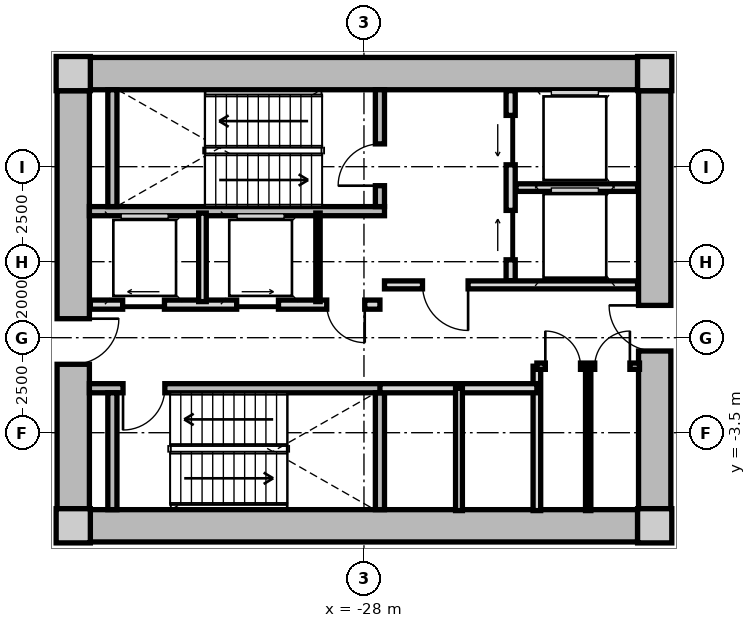
"""IFC4 building model, lengths in metres.
Left out: names, types, materials, properties, quantities, classifications, styles, units other than length and angle.
Written with IfcOpenShell. Run it as: python <this file> out.ifc"""

import sys

from ifc_helpers import new_model, si_unit, direction, frame, frame_2d, origin, origin_2d, place, context, subcontext, project, spatial, rectangle, extrude, source, transform, mapped, element, fill, save


model = new_model("IFC4")
c1 = context("Model", 3, precision=1e-05, world=origin(), true_north=direction((0.0, 1.0)))
c2 = subcontext(c1, "Body", "Model", "MODEL_VIEW")
j1 = project(units=[si_unit("LENGTHUNIT", "METRE"), si_unit("PLANEANGLEUNIT", "RADIAN")], contexts=[c1])
p1 = place(None, origin())
s1 = spatial("IfcSite", under=j1, at=p1, CompositionType="ELEMENT")
p2 = place(p1, origin())
s2 = spatial("IfcBuilding", under=s1, at=p2, CompositionType="ELEMENT")
p3 = place(p2, frame((0.0, 0.0, 12.6)))
s3 = spatial("IfcBuildingStorey", under=s2, at=p3, CompositionType="ELEMENT", Elevation=12.6)
m1 = source(origin(), c2, "Body", "SweptSolid", [
    extrude(rectangle(XDim=0.9, YDim=0.9, at=origin_2d()), origin(), (0.0, 0.0, 1.0), 4.2),
])
for number, where, z_axis, x_axis in (
    (1, (-35.65, -5.95, 0.0), (0.0, 0.0, 1.0), (1.0, 0.0, 0.0)),
    (2, (-20.35, -5.95, 0.0), (0.0, 0.0, 1.0), (1.0, 0.0, 0.0)),
    (3, (-20.35, 5.95, 0.0), (0.0, 0.0, 1.0), (1.0, 0.0, 0.0)),
    (4, (-35.65, 5.95, 0.0), (0.0, 0.0, 1.0), (1.0, 0.0, 0.0)),
):
    element("IfcColumn", number, at=place(p3, frame(where, z_axis=z_axis, x_axis=x_axis)), inside=s3, PredefinedType="COLUMN", context=c2, shape_type="MappedRepresentation", body=[
        mapped(m1, transform((0.0, 0.0, 0.0), x_axis=(1.0, 0.0, 0.0), y_axis=(0.0, 1.0, 0.0), z_axis=(0.0, 0.0, 1.0), scale=1.0)),
    ])
m2 = source(origin(), c2, "Body", "SweptSolid", [
    extrude(rectangle(XDim=14.4, YDim=0.85, at=frame_2d((7.2, 0.0))), origin(), (0.0, 0.0, 1.0), 3.88),
])
for number, where, z_axis, x_axis in (
    (5, (-35.2, 5.95, 0.0), (0.0, 0.0, 1.0), (1.0, 0.0, 0.0)),
    (6, (-20.8, -5.95, 0.0), (0.0, 0.0, 1.0), (-1.0, 0.0, 0.0)),
):
    element("IfcWall", number, at=place(p3, frame(where, z_axis=z_axis, x_axis=x_axis)), inside=s3, PredefinedType="SHEAR", context=c2, shape_type="MappedRepresentation", body=[
        mapped(m2, transform((0.0, 0.0, 0.0), x_axis=(1.0, 0.0, 0.0), y_axis=(0.0, 1.0, 0.0), z_axis=(0.0, 0.0, 1.0), scale=1.0)),
    ])
m3 = source(origin(), c2, "Body", "SweptSolid", [
    extrude(rectangle(XDim=11.0, YDim=0.85, at=frame_2d((5.5, 0.0))), origin(), (0.0, 0.0, 1.0), 3.88),
])
p4 = place(p3, frame((-35.65, -5.5, 0.0), z_axis=(0.0, 0.0, 1.0), x_axis=(0.0, 1.0, 0.0)))
e7 = element("IfcWall", 7, at=p4, inside=s3, PredefinedType="SHEAR", context=c2, shape_type="MappedRepresentation", body=[
    mapped(m3, transform((0.0, 0.0, 0.0), x_axis=(1.0, 0.0, 0.0), y_axis=(0.0, 1.0, 0.0), z_axis=(0.0, 0.0, 1.0), scale=1.0)),
])
p5 = place(p4, frame((3.8, 0.0, 0.0)))
e8 = element("IfcOpeningElement", 8, at=p5, cuts=e7, PredefinedType="OPENING", context=c2, shape_type="SweptSolid", body=[
    extrude(rectangle(XDim=1.2, YDim=2.15, at=frame_2d((0.6, 1.075))), frame((0.0, 0.435, 0.0), z_axis=(0.0, -1.0, 0.0), x_axis=(1.0, 0.0, 0.0)), (0.0, 0.0, 1.0), 0.87),
])
p6 = place(p3, frame((-20.35, 5.5, 0.0), z_axis=(0.0, 0.0, 1.0), x_axis=(0.0, -1.0, 0.0)))
e9 = element("IfcWall", 9, at=p6, inside=s3, PredefinedType="SHEAR", context=c2, shape_type="MappedRepresentation", body=[
    mapped(m3, transform((0.0, 0.0, 0.0), x_axis=(1.0, 0.0, 0.0), y_axis=(0.0, 1.0, 0.0), z_axis=(0.0, 0.0, 1.0), scale=1.0)),
])
p7 = place(p6, frame((5.65, 0.0, 0.0)))
e10 = element("IfcOpeningElement", 10, at=p7, cuts=e9, PredefinedType="OPENING", context=c2, shape_type="SweptSolid", body=[
    extrude(rectangle(XDim=1.2, YDim=2.15, at=frame_2d((0.6, 1.075))), frame((0.0, 0.435, 0.0), z_axis=(0.0, -1.0, 0.0), x_axis=(1.0, 0.0, 0.0)), (0.0, 0.0, 1.0), 0.87),
])
m4 = source(origin(), c2, "Body", "SweptSolid", [
    extrude(rectangle(XDim=7.765, YDim=0.24, at=frame_2d((3.883, 0.0))), origin(), (0.0, 0.0, 1.0), 3.88),
])
p8 = place(p3, frame((-35.225, 2.33, 0.0), z_axis=(0.0, 0.0, 1.0), x_axis=(1.0, 0.0, 0.0)))
e11 = element("IfcWall", 11, at=p8, inside=s3, PredefinedType="PARTITIONING", context=c2, shape_type="MappedRepresentation", body=[
    mapped(m4, transform((0.0, 0.0, 0.0), x_axis=(1.0, 0.0, 0.0), y_axis=(0.0, 1.0, 0.0), z_axis=(0.0, 0.0, 1.0), scale=1.0)),
])
m5 = source(origin(), c2, "Body", "SweptSolid", [
    extrude(rectangle(XDim=3.075, YDim=0.24, at=frame_2d((1.538, 0.0))), origin(), (0.0, 0.0, 1.0), 3.88),
])
p9 = place(p3, frame((-34.62, 2.45, 0.0), z_axis=(0.0, 0.0, 1.0), x_axis=(0.0, 1.0, 0.0)))
e12 = element("IfcWall", 12, at=p9, inside=s3, PredefinedType="PARTITIONING", context=c2, shape_type="MappedRepresentation", body=[
    mapped(m5, transform((0.0, 0.0, 0.0), x_axis=(1.0, 0.0, 0.0), y_axis=(0.0, 1.0, 0.0), z_axis=(0.0, 0.0, 1.0), scale=1.0)),
])
p10 = place(p3, frame((-27.58, 2.45, 0.0), z_axis=(0.0, 0.0, 1.0), x_axis=(0.0, 1.0, 0.0)))
e13 = element("IfcWall", 13, at=p10, inside=s3, PredefinedType="PARTITIONING", context=c2, shape_type="MappedRepresentation", body=[
    mapped(m5, transform((0.0, 0.0, 0.0), x_axis=(1.0, 0.0, 0.0), y_axis=(0.0, 1.0, 0.0), z_axis=(0.0, 0.0, 1.0), scale=1.0)),
])
p11 = place(p10, frame((0.55, 0.0, 0.0)))
e14 = element("IfcOpeningElement", 14, at=p11, cuts=e13, PredefinedType="OPENING", context=c2, shape_type="SweptSolid", body=[
    extrude(rectangle(XDim=1.1, YDim=2.15, at=frame_2d((0.55, 1.075))), frame((0.0, 0.13, 0.0), z_axis=(0.0, -1.0, 0.0), x_axis=(1.0, 0.0, 0.0)), (0.0, 0.0, 1.0), 0.26),
])
p12 = place(p3, frame((-35.225, -2.33, 0.0), z_axis=(0.0, 0.0, 1.0), x_axis=(1.0, 0.0, 0.0)))
e15 = element("IfcWall", 15, at=p12, inside=s3, PredefinedType="PARTITIONING", context=c2, shape_type="MappedRepresentation", body=[
    mapped(m4, transform((0.0, 0.0, 0.0), x_axis=(1.0, 0.0, 0.0), y_axis=(0.0, 1.0, 0.0), z_axis=(0.0, 0.0, 1.0), scale=1.0)),
])
p13 = place(p12, frame((0.885, 0.0, 0.0)))
e16 = element("IfcOpeningElement", 16, at=p13, cuts=e15, PredefinedType="OPENING", context=c2, shape_type="SweptSolid", body=[
    extrude(rectangle(XDim=1.1, YDim=2.15, at=frame_2d((0.55, 1.075))), frame((0.0, 0.13, 0.0), z_axis=(0.0, -1.0, 0.0), x_axis=(1.0, 0.0, 0.0)), (0.0, 0.0, 1.0), 0.26),
])
for number, where, z_axis, x_axis in (
    (17, (-34.62, -5.525, 0.0), (0.0, 0.0, 1.0), (0.0, 1.0, 0.0)),
    (18, (-27.58, -5.525, 0.0), (0.0, 0.0, 1.0), (0.0, 1.0, 0.0)),
):
    element("IfcWall", number, at=place(p3, frame(where, z_axis=z_axis, x_axis=x_axis)), inside=s3, PredefinedType="PARTITIONING", context=c2, shape_type="MappedRepresentation", body=[
        mapped(m5, transform((0.0, 0.0, 0.0), x_axis=(1.0, 0.0, 0.0), y_axis=(0.0, 1.0, 0.0), z_axis=(0.0, 0.0, 1.0), scale=1.0)),
    ])
m6 = source(origin(), c2, "Body", "SweptSolid", [
    extrude(rectangle(XDim=5.0, YDim=0.24, at=frame_2d((2.5, 0.0))), origin(), (0.0, 0.0, 1.0), 3.865),
])
p14 = place(p3, frame((-24.14, 0.5, 0.0), z_axis=(0.0, 0.0, 1.0), x_axis=(0.0, 1.0, 0.0)))
e19 = element("IfcWall", 19, at=p14, inside=s3, PredefinedType="PARTITIONING", context=c2, shape_type="MappedRepresentation", body=[
    mapped(m6, transform((0.0, 0.0, 0.0), x_axis=(1.0, 0.0, 0.0), y_axis=(0.0, 1.0, 0.0), z_axis=(0.0, 0.0, 1.0), scale=1.0)),
])
p15 = place(p14, frame((3.05, 0.0, 0.0)))
e20 = element("IfcOpeningElement", 20, at=p15, cuts=e19, PredefinedType="OPENING", context=c2, shape_type="SweptSolid", body=[
    extrude(rectangle(XDim=1.3, YDim=2.2, at=frame_2d((0.65, 1.1))), frame((0.0, 0.13, 0.0), z_axis=(0.0, -1.0, 0.0), x_axis=(1.0, 0.0, 0.0)), (0.0, 0.0, 1.0), 0.26),
])
p16 = place(p14, frame((0.55, 0.0, 0.0)))
e21 = element("IfcOpeningElement", 21, at=p16, cuts=e19, PredefinedType="OPENING", context=c2, shape_type="SweptSolid", body=[
    extrude(rectangle(XDim=1.3, YDim=2.2, at=frame_2d((0.65, 1.1))), frame((0.0, 0.13, 0.0), z_axis=(0.0, -1.0, 0.0), x_axis=(1.0, 0.0, 0.0)), (0.0, 0.0, 1.0), 0.26),
])
m7 = source(origin(), c2, "Body", "SweptSolid", [
    extrude(rectangle(XDim=3.2, YDim=0.2, at=frame_2d((1.6, 0.0))), origin(), (0.0, 0.0, 1.0), 3.865),
])
p17 = place(p3, frame((-24.0, 2.95, 0.0), z_axis=(0.0, 0.0, 1.0), x_axis=(1.0, 0.0, 0.0)))
e22 = element("IfcWall", 22, at=p17, inside=s3, PredefinedType="PARTITIONING", context=c2, shape_type="MappedRepresentation", body=[
    mapped(m7, transform((0.0, 0.0, 0.0), x_axis=(1.0, 0.0, 0.0), y_axis=(0.0, 1.0, 0.0), z_axis=(0.0, 0.0, 1.0), scale=1.0)),
])
m8 = source(origin(), c2, "Body", "SweptSolid", [
    extrude(rectangle(XDim=6.66, YDim=0.21, at=frame_2d((3.33, 0.0))), origin(), (0.0, 0.0, 1.0), 3.865),
])
p18 = place(p3, frame((-27.46, 0.39, 0.0), z_axis=(0.0, 0.0, 1.0), x_axis=(1.0, 0.0, 0.0)))
e23 = element("IfcWall", 23, at=p18, inside=s3, PredefinedType="PARTITIONING", context=c2, shape_type="MappedRepresentation", body=[
    mapped(m8, transform((0.0, 0.0, 0.0), x_axis=(1.0, 0.0, 0.0), y_axis=(0.0, 1.0, 0.0), z_axis=(0.0, 0.0, 1.0), scale=1.0)),
])
p19 = place(p18, frame((1.0, 0.0, 0.0)))
e24 = element("IfcOpeningElement", 24, at=p19, cuts=e23, PredefinedType="OPENING", context=c2, shape_type="SweptSolid", body=[
    extrude(rectangle(XDim=1.2, YDim=2.15, at=frame_2d((0.6, 1.075))), frame((0.0, 0.115, 0.0), z_axis=(0.0, -1.0, 0.0), x_axis=(1.0, 0.0, 0.0)), (0.0, 0.0, 1.0), 0.23),
])
m9 = source(origin(), c2, "Body", "SweptSolid", [
    extrude(rectangle(XDim=7.62, YDim=0.24, at=frame_2d((3.81, 0.0))), origin(), (0.0, 0.0, 1.0), 3.865),
])
p20 = place(p3, frame((-35.2, -0.13, 0.0), z_axis=(0.0, 0.0, 1.0), x_axis=(1.0, 0.0, 0.0)))
e25 = element("IfcWall", 25, at=p20, inside=s3, PredefinedType="PARTITIONING", context=c2, shape_type="MappedRepresentation", body=[
    mapped(m9, transform((0.0, 0.0, 0.0), x_axis=(1.0, 0.0, 0.0), y_axis=(0.0, 1.0, 0.0), z_axis=(0.0, 0.0, 1.0), scale=1.0)),
])
p21 = place(p20, frame((6.22, 0.0, 0.0)))
e26 = element("IfcOpeningElement", 26, at=p21, cuts=e25, PredefinedType="OPENING", context=c2, shape_type="SweptSolid", body=[
    extrude(rectangle(XDim=1.0, YDim=2.1, at=frame_2d((0.5, 1.05))), frame((0.0, 0.13, 0.0), z_axis=(0.0, -1.0, 0.0), x_axis=(1.0, 0.0, 0.0)), (0.0, 0.0, 1.0), 0.26),
])
p22 = place(p20, frame((0.85, 0.0, 0.0)))
e27 = element("IfcOpeningElement", 27, at=p22, cuts=e25, PredefinedType="OPENING", context=c2, shape_type="SweptSolid", body=[
    extrude(rectangle(XDim=1.1, YDim=2.2, at=frame_2d((0.55, 1.1))), frame((0.0, 0.13, 0.0), z_axis=(0.0, -1.0, 0.0), x_axis=(1.0, 0.0, 0.0)), (0.0, 0.0, 1.0), 0.26),
])
p23 = place(p20, frame((3.85, 0.0, 0.0)))
e28 = element("IfcOpeningElement", 28, at=p23, cuts=e25, PredefinedType="OPENING", context=c2, shape_type="SweptSolid", body=[
    extrude(rectangle(XDim=1.1, YDim=2.2, at=frame_2d((0.55, 1.1))), frame((0.0, 0.13, 0.0), z_axis=(0.0, -1.0, 0.0), x_axis=(1.0, 0.0, 0.0)), (0.0, 0.0, 1.0), 0.26),
])
m10 = source(origin(), c2, "Body", "SweptSolid", [
    extrude(rectangle(XDim=2.33, YDim=0.115, at=frame_2d((1.165, 0.0))), origin(), (0.0, 0.0, 1.0), 3.865),
])
p24 = place(p3, frame((-29.21, -0.05, 0.0), z_axis=(0.0, 0.0, 1.0), x_axis=(0.0, 1.0, 0.0)))
e29 = element("IfcWall", 29, at=p24, inside=s3, PredefinedType="PARTITIONING", context=c2, shape_type="MappedRepresentation", body=[
    mapped(m10, transform((0.0, 0.0, 0.0), x_axis=(1.0, 0.0, 0.0), y_axis=(0.0, 1.0, 0.0), z_axis=(0.0, 0.0, 1.0), scale=1.0)),
])
m11 = source(origin(), c2, "Body", "SweptSolid", [
    extrude(rectangle(XDim=2.33, YDim=0.2, at=frame_2d((1.165, 0.0))), origin(), (0.0, 0.0, 1.0), 3.865),
])
p25 = place(p3, frame((-32.25, -0.05, 0.0), z_axis=(0.0, 0.0, 1.0), x_axis=(0.0, 1.0, 0.0)))
e30 = element("IfcWall", 30, at=p25, inside=s3, PredefinedType="PARTITIONING", context=c2, shape_type="MappedRepresentation", body=[
    mapped(m11, transform((0.0, 0.0, 0.0), x_axis=(1.0, 0.0, 0.0), y_axis=(0.0, 1.0, 0.0), z_axis=(0.0, 0.0, 1.0), scale=1.0)),
])
m12 = source(origin(), c2, "Body", "SweptSolid", [
    extrude(rectangle(XDim=3.8, YDim=0.2, at=frame_2d((1.9, 0.0))), origin(), (0.0, 0.0, 1.0), 3.865),
])
p26 = place(p3, frame((-23.45, -5.55, 0.0), z_axis=(0.0, 0.0, 1.0), x_axis=(0.0, 1.0, 0.0)))
e31 = element("IfcWall", 31, at=p26, inside=s3, PredefinedType="PARTITIONING", context=c2, shape_type="MappedRepresentation", body=[
    mapped(m12, transform((0.0, 0.0, 0.0), x_axis=(1.0, 0.0, 0.0), y_axis=(0.0, 1.0, 0.0), z_axis=(0.0, 0.0, 1.0), scale=1.0)),
])
m13 = source(origin(), c2, "Body", "SweptSolid", [
    extrude(rectangle(XDim=4.13, YDim=0.24, at=frame_2d((2.065, 0.0))), origin(), (0.0, 0.0, 1.0), 3.865),
])
p27 = place(p3, frame((-27.58, -2.33, 0.0), z_axis=(0.0, 0.0, 1.0), x_axis=(1.0, 0.0, 0.0)))
e32 = element("IfcWall", 32, at=p27, inside=s3, PredefinedType="PARTITIONING", context=c2, shape_type="MappedRepresentation", body=[
    mapped(m13, transform((0.0, 0.0, 0.0), x_axis=(1.0, 0.0, 0.0), y_axis=(0.0, 1.0, 0.0), z_axis=(0.0, 0.0, 1.0), scale=1.0)),
])
m14 = source(origin(), c2, "Body", "SweptSolid", [
    extrude(rectangle(XDim=3.22, YDim=0.18, at=frame_2d((1.61, 0.0))), origin(), (0.0, 0.0, 1.0), 3.865),
])
p28 = place(p3, frame((-25.5, -5.55, 0.0), z_axis=(0.0, 0.0, 1.0), x_axis=(0.0, 1.0, 0.0)))
e33 = element("IfcWall", 33, at=p28, inside=s3, PredefinedType="PARTITIONING", context=c2, shape_type="MappedRepresentation", body=[
    mapped(m14, transform((0.0, 0.0, 0.0), x_axis=(1.0, 0.0, 0.0), y_axis=(0.0, 1.0, 0.0), z_axis=(0.0, 0.0, 1.0), scale=1.0)),
])
m15 = source(origin(), c2, "Body", "SweptSolid", [
    extrude(rectangle(XDim=2.7, YDim=0.165, at=frame_2d((1.35, 0.0))), origin(), (0.0, 0.0, 1.0), 3.865),
])
p29 = place(p3, frame((-23.45, -1.75, 0.0), z_axis=(0.0, 0.0, 1.0), x_axis=(1.0, 0.0, 0.0)))
e34 = element("IfcWall", 34, at=p29, inside=s3, PredefinedType="PARTITIONING", context=c2, shape_type="MappedRepresentation", body=[
    mapped(m15, transform((0.0, 0.0, 0.0), x_axis=(1.0, 0.0, 0.0), y_axis=(0.0, 1.0, 0.0), z_axis=(0.0, 0.0, 1.0), scale=1.0)),
])
p30 = place(p29, frame((0.222, 0.0, 0.0)))
e35 = element("IfcOpeningElement", 35, at=p30, cuts=e34, PredefinedType="OPENING", context=c2, shape_type="SweptSolid", body=[
    extrude(rectangle(XDim=0.925, YDim=2.1, at=frame_2d((0.462, 1.05))), frame((0.0, 0.093, 0.0), z_axis=(0.0, -1.0, 0.0), x_axis=(1.0, 0.0, 0.0)), (0.0, 0.0, 1.0), 0.185),
])
p31 = place(p29, frame((1.522, 0.0, 0.0)))
e36 = element("IfcOpeningElement", 36, at=p31, cuts=e34, PredefinedType="OPENING", context=c2, shape_type="SweptSolid", body=[
    extrude(rectangle(XDim=0.925, YDim=2.1, at=frame_2d((0.462, 1.05))), frame((0.0, 0.093, 0.0), z_axis=(0.0, -1.0, 0.0), x_axis=(1.0, 0.0, 0.0)), (0.0, 0.0, 1.0), 0.185),
])
m16 = source(origin(), c2, "Body", "SweptSolid", [
    extrude(rectangle(XDim=3.8, YDim=0.14, at=frame_2d((1.9, 0.0))), origin(), (0.0, 0.0, 1.0), 3.865),
])
p32 = place(p3, frame((-22.1, -5.55, 0.0), z_axis=(0.0, 0.0, 1.0), x_axis=(0.0, 1.0, 0.0)))
e37 = element("IfcWall", 37, at=p32, inside=s3, PredefinedType="PARTITIONING", context=c2, shape_type="MappedRepresentation", body=[
    mapped(m16, transform((0.0, 0.0, 0.0), x_axis=(1.0, 0.0, 0.0), y_axis=(0.0, 1.0, 0.0), z_axis=(0.0, 0.0, 1.0), scale=1.0)),
])
m17 = source(origin(), c2, "Body", "SweptSolid", [
    extrude(rectangle(XDim=1.1, YDim=2.15, at=frame_2d((0.55, 1.075))), frame((0.0, 0.025, 0.0), z_axis=(0.0, -1.0, 0.0), x_axis=(1.0, 0.0, 0.0)), (0.0, 0.0, 1.0), 0.05),
])
p33 = place(p11, origin())
e38 = element("IfcDoor", 38, at=p33, inside=s3, OperationType="SINGLE_SWING_LEFT", PredefinedType="DOOR", context=c2, shape_type="MappedRepresentation", body=[
    mapped(m17, transform((0.0, 0.0, 0.0), x_axis=(1.0, 0.0, 0.0), y_axis=(0.0, 1.0, 0.0), z_axis=(0.0, 0.0, 1.0), scale=1.0)),
])
fill(e14, e38)
p34 = place(p13, frame((1.1, 0.0, 0.0), z_axis=(0.0, 0.0, 1.0), x_axis=(-1.0, 0.0, 0.0)))
e39 = element("IfcDoor", 39, at=p34, inside=s3, OperationType="SINGLE_SWING_RIGHT", PredefinedType="DOOR", context=c2, shape_type="MappedRepresentation", body=[
    mapped(m17, transform((0.0, 0.0, 0.0), x_axis=(1.0, 0.0, 0.0), y_axis=(0.0, 1.0, 0.0), z_axis=(0.0, 0.0, 1.0), scale=1.0)),
])
fill(e16, e39)
m18 = source(origin(), c2, "Body", "SweptSolid", [
    extrude(rectangle(XDim=1.3, YDim=2.2, at=frame_2d((0.65, 1.1))), frame((0.0, 0.025, 0.0), z_axis=(0.0, -1.0, 0.0), x_axis=(1.0, 0.0, 0.0)), (0.0, 0.0, 1.0), 0.05),
])
p35 = place(p15, origin())
e40 = element("IfcDoor", 40, at=p35, inside=s3, OperationType="SLIDING_TO_LEFT", PredefinedType="DOOR", context=c2, shape_type="MappedRepresentation", body=[
    mapped(m18, transform((0.0, 0.0, 0.0), x_axis=(1.0, 0.0, 0.0), y_axis=(0.0, 1.0, 0.0), z_axis=(0.0, 0.0, 1.0), scale=1.0)),
])
fill(e20, e40)
p36 = place(p16, origin())
e41 = element("IfcDoor", 41, at=p36, inside=s3, OperationType="SLIDING_TO_RIGHT", PredefinedType="DOOR", context=c2, shape_type="MappedRepresentation", body=[
    mapped(m18, transform((0.0, 0.0, 0.0), x_axis=(1.0, 0.0, 0.0), y_axis=(0.0, 1.0, 0.0), z_axis=(0.0, 0.0, 1.0), scale=1.0)),
])
fill(e21, e41)
m19 = source(origin(), c2, "Body", "SweptSolid", [
    extrude(rectangle(XDim=1.2, YDim=2.15, at=frame_2d((0.6, 1.075))), frame((0.0, 0.025, 0.0), z_axis=(0.0, -1.0, 0.0), x_axis=(1.0, 0.0, 0.0)), (0.0, 0.0, 1.0), 0.05),
])
p37 = place(p19, frame((1.2, 0.0, 0.0), z_axis=(0.0, 0.0, 1.0), x_axis=(-1.0, 0.0, 0.0)))
e42 = element("IfcDoor", 42, at=p37, inside=s3, OperationType="SINGLE_SWING_LEFT", PredefinedType="DOOR", context=c2, shape_type="MappedRepresentation", body=[
    mapped(m19, transform((0.0, 0.0, 0.0), x_axis=(1.0, 0.0, 0.0), y_axis=(0.0, 1.0, 0.0), z_axis=(0.0, 0.0, 1.0), scale=1.0)),
])
fill(e24, e42)
p38 = place(p5, frame((1.2, 0.0, 0.0), z_axis=(0.0, 0.0, 1.0), x_axis=(-1.0, 0.0, 0.0)))
e43 = element("IfcDoor", 43, at=p38, inside=s3, OperationType="SINGLE_SWING_LEFT", PredefinedType="DOOR", context=c2, shape_type="MappedRepresentation", body=[
    mapped(m19, transform((0.0, 0.0, 0.0), x_axis=(1.0, 0.0, 0.0), y_axis=(0.0, 1.0, 0.0), z_axis=(0.0, 0.0, 1.0), scale=1.0)),
])
fill(e8, e43)
p39 = place(p7, frame((1.2, 0.0, 0.0), z_axis=(0.0, 0.0, 1.0), x_axis=(-1.0, 0.0, 0.0)))
e44 = element("IfcDoor", 44, at=p39, inside=s3, OperationType="SINGLE_SWING_RIGHT", PredefinedType="DOOR", context=c2, shape_type="MappedRepresentation", body=[
    mapped(m19, transform((0.0, 0.0, 0.0), x_axis=(1.0, 0.0, 0.0), y_axis=(0.0, 1.0, 0.0), z_axis=(0.0, 0.0, 1.0), scale=1.0)),
])
fill(e10, e44)
m20 = source(origin(), c2, "Body", "SweptSolid", [
    extrude(rectangle(XDim=1.0, YDim=2.1, at=frame_2d((0.5, 1.05))), frame((0.0, 0.025, 0.0), z_axis=(0.0, -1.0, 0.0), x_axis=(1.0, 0.0, 0.0)), (0.0, 0.0, 1.0), 0.05),
])
p40 = place(p21, frame((1.0, 0.0, 0.0), z_axis=(0.0, 0.0, 1.0), x_axis=(-1.0, 0.0, 0.0)))
e45 = element("IfcDoor", 45, at=p40, inside=s3, OperationType="SINGLE_SWING_LEFT", PredefinedType="DOOR", context=c2, shape_type="MappedRepresentation", body=[
    mapped(m20, transform((0.0, 0.0, 0.0), x_axis=(1.0, 0.0, 0.0), y_axis=(0.0, 1.0, 0.0), z_axis=(0.0, 0.0, 1.0), scale=1.0)),
])
fill(e26, e45)
m21 = source(origin(), c2, "Body", "SweptSolid", [
    extrude(rectangle(XDim=1.1, YDim=2.2, at=frame_2d((0.55, 1.1))), frame((0.0, 0.025, 0.0), z_axis=(0.0, -1.0, 0.0), x_axis=(1.0, 0.0, 0.0)), (0.0, 0.0, 1.0), 0.05),
])
p41 = place(p22, origin())
e46 = element("IfcDoor", 46, at=p41, inside=s3, OperationType="SLIDING_TO_LEFT", PredefinedType="DOOR", context=c2, shape_type="MappedRepresentation", body=[
    mapped(m21, transform((0.0, 0.0, 0.0), x_axis=(1.0, 0.0, 0.0), y_axis=(0.0, 1.0, 0.0), z_axis=(0.0, 0.0, 1.0), scale=1.0)),
])
fill(e27, e46)
p42 = place(p23, origin())
e47 = element("IfcDoor", 47, at=p42, inside=s3, OperationType="SLIDING_TO_RIGHT", PredefinedType="DOOR", context=c2, shape_type="MappedRepresentation", body=[
    mapped(m21, transform((0.0, 0.0, 0.0), x_axis=(1.0, 0.0, 0.0), y_axis=(0.0, 1.0, 0.0), z_axis=(0.0, 0.0, 1.0), scale=1.0)),
])
fill(e28, e47)
m22 = source(origin(), c2, "Body", "SweptSolid", [
    extrude(rectangle(XDim=0.925, YDim=2.1, at=frame_2d((0.462, 1.05))), frame((0.0, 0.025, 0.0), z_axis=(0.0, -1.0, 0.0), x_axis=(1.0, 0.0, 0.0)), (0.0, 0.0, 1.0), 0.05),
])
p43 = place(p30, origin())
e48 = element("IfcDoor", 48, at=p43, inside=s3, OperationType="SINGLE_SWING_LEFT", PredefinedType="DOOR", context=c2, shape_type="MappedRepresentation", body=[
    mapped(m22, transform((0.0, 0.0, 0.0), x_axis=(1.0, 0.0, 0.0), y_axis=(0.0, 1.0, 0.0), z_axis=(0.0, 0.0, 1.0), scale=1.0)),
])
fill(e35, e48)
p44 = place(p31, origin())
e49 = element("IfcDoor", 49, at=p44, inside=s3, OperationType="SINGLE_SWING_RIGHT", PredefinedType="DOOR", context=c2, shape_type="MappedRepresentation", body=[
    mapped(m22, transform((0.0, 0.0, 0.0), x_axis=(1.0, 0.0, 0.0), y_axis=(0.0, 1.0, 0.0), z_axis=(0.0, 0.0, 1.0), scale=1.0)),
])
fill(e36, e49)
save(model, sys.argv[1])
